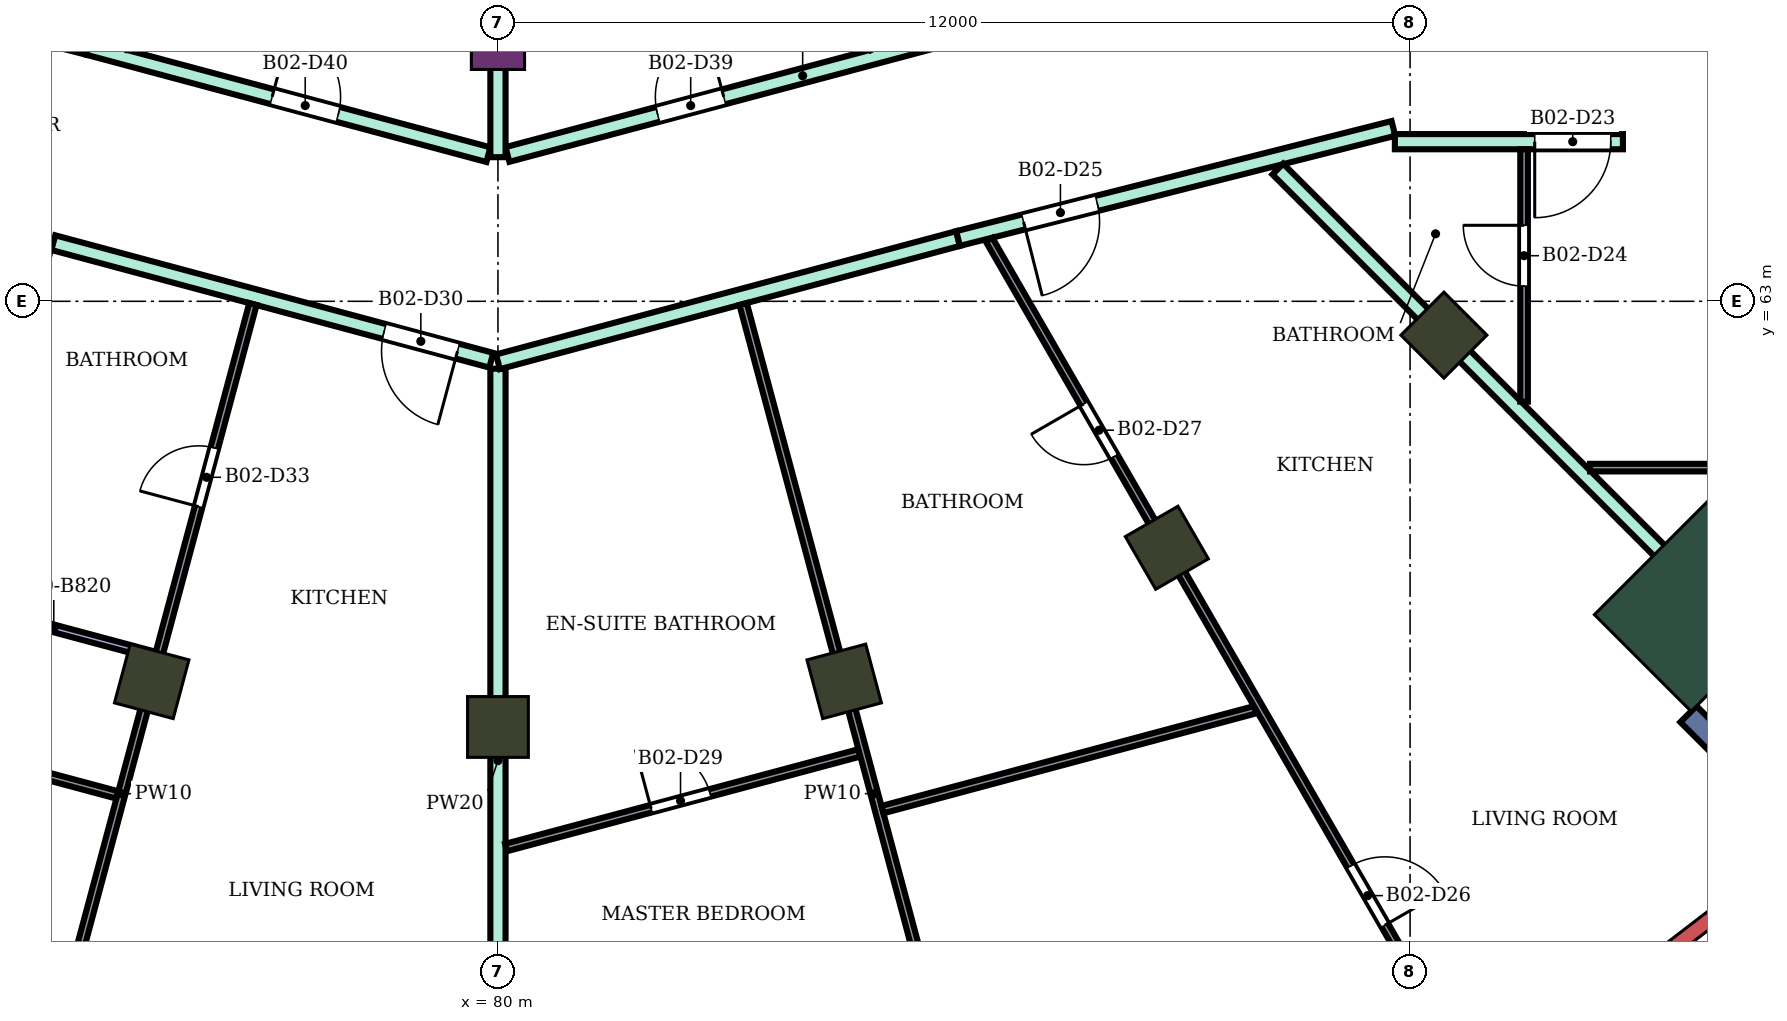
"""IFC4 building model, lengths in metres.
Left out: names, types, materials, properties, quantities, classifications, styles, units other than length and angle.
Written with IfcOpenShell. Run it as: python <this file> out.ifc"""

import sys

from ifc_helpers import new_model, si_unit, direction, frame, frame_2d, origin, origin_2d, place, context, subcontext, project, spatial, rectangle, extrude, element, fill, save


model = new_model("IFC4")
c1 = context("Model", 3, precision=1e-05, world=origin(), true_north=direction((0.0, 1.0)))
c2 = subcontext(c1, "Body", "Model", "MODEL_VIEW")
j1 = project(units=[si_unit("LENGTHUNIT", "METRE"), si_unit("PLANEANGLEUNIT", "RADIAN")], contexts=[c1])
p1 = place(None, origin())
s1 = spatial("IfcSite", under=j1, at=p1, CompositionType="ELEMENT")
p2 = place(p1, origin())
s2 = spatial("IfcBuilding", under=s1, at=p2, CompositionType="ELEMENT")
p3 = place(p2, frame((0.0, 0.0, 220.9)))
s3 = spatial("IfcBuildingStorey", under=s2, at=p3, CompositionType="ELEMENT", Elevation=220.9)
for number, where, z_axis, x_axis in (
    (1, (75.445, 58.0, 0.0), (0.0, 0.0, 1.0), (-0.259, -0.966, 0.0)),
    (2, (80.0, 57.4, 0.0), (0.0, 0.0, 1.0), (0.0, -1.0, 0.0)),
    (3, (84.555, 58.0, 0.0), (0.0, 0.0, 1.0), (0.259, -0.966, 0.0)),
    (4, (88.8, 59.758, 0.0), (0.0, 0.0, 1.0), (0.5, -0.866, 0.0)),
    (5, (92.445, 62.555, 0.0), (0.0, 0.0, 1.0), (0.707, -0.707, 0.0)),
):
    element("IfcColumn", number, at=place(p3, frame(where, z_axis=z_axis, x_axis=x_axis)), inside=s3, PredefinedType="COLUMN", context=c2, shape_type="SweptSolid", body=[
        extrude(rectangle(XDim=0.8, YDim=0.8, at=origin_2d()), origin(), (0.0, 0.0, 1.0), 4.2),
    ])
p4 = place(p3, frame((80.0, 66.4, 0.0), z_axis=(0.0, 0.0, 1.0), x_axis=(0.0, -1.0, 0.0)))
e6 = element("IfcColumn", 6, at=p4, inside=s3, PredefinedType="COLUMN", context=c2, shape_type="SweptSolid", body=[
    extrude(rectangle(XDim=0.7, YDim=0.7, at=origin_2d()), origin(), (0.0, 0.0, 1.0), 4.2),
])
p5 = place(p3, frame((95.91, 59.09, 0.0), z_axis=(0.0, 0.0, 1.0), x_axis=(0.707106781187, -0.707106781187, 0.0)))
e7 = element("IfcColumn", 7, at=p5, inside=s3, PredefinedType="COLUMN", context=c2, shape_type="SweptSolid", body=[
    extrude(rectangle(XDim=1.8, YDim=2.4, at=origin_2d()), origin(), (0.0, 0.0, 1.0), 4.2),
])
p6 = place(p3, frame((95.662, 57.57, 0.0), z_axis=(0.0, 0.0, 1.0), x_axis=(0.707106781187, -0.707106781187, 0.0)))
e8 = element("IfcWall", 8, at=p6, inside=s3, PredefinedType="NOTDEFINED", context=c2, shape_type="SweptSolid", body=[
    extrude(rectangle(XDim=2.416, YDim=0.3, at=frame_2d((1.208, 0.0))), origin(), (0.0, 0.0, 1.0), 4.2),
])
p7 = place(p3, frame((72.1, 66.975, 0.0), z_axis=(0.0, 0.0, 1.0), x_axis=(0.969471314457, -0.245204752086, 0.0)))
e9 = element("IfcWall", 9, at=p7, inside=s3, PredefinedType="PARTITIONING", context=c2, shape_type="SweptSolid", body=[
    extrude(rectangle(XDim=2.582, YDim=0.2, at=frame_2d((1.291, 0.0))), origin(), (0.0, 0.0, 1.0), 3.75),
])
p8 = place(p7, frame((0.841, 0.0, 0.0)))
e10 = element("IfcOpeningElement", 10, at=p8, cuts=e9, PredefinedType="OPENING", context=c2, shape_type="SweptSolid", body=[
    extrude(rectangle(XDim=0.9, YDim=2.1, at=frame_2d((0.45, 1.05))), frame((0.0, 0.11, 0.0), z_axis=(0.0, -1.0, 0.0), x_axis=(1.0, 0.0, 0.0)), (0.0, 0.0, 1.0), 0.22),
])
p9 = place(p3, frame((74.15, 63.772, 0.0), z_axis=(0.0, 0.0, 1.0), x_axis=(0.965807109237, -0.259261697417, 0.0)))
e11 = element("IfcWall", 11, at=p9, inside=s3, PredefinedType="PARTITIONING", context=c2, shape_type="SweptSolid", body=[
    extrude(rectangle(XDim=5.967, YDim=0.2, at=frame_2d((2.983, 0.0))), origin(), (0.0, 0.0, 1.0), 3.75),
])
p10 = place(p9, frame((4.507, 0.0, 0.0)))
e12 = element("IfcOpeningElement", 12, at=p10, cuts=e11, PredefinedType="OPENING", context=c2, shape_type="SweptSolid", body=[
    extrude(rectangle(XDim=1.0, YDim=2.1, at=frame_2d((0.5, 1.05))), frame((0.0, 0.11, 0.0), z_axis=(0.0, -1.0, 0.0), x_axis=(1.0, 0.0, 0.0)), (0.0, 0.0, 1.0), 0.22),
])
p11 = place(p3, frame((74.603, 66.342, 0.0), z_axis=(0.0, 0.0, 1.0), x_axis=(0.965920893652, -0.258837453254, 0.0)))
e13 = element("IfcWall", 13, at=p11, inside=s3, PredefinedType="PARTITIONING", context=c2, shape_type="SweptSolid", body=[
    extrude(rectangle(XDim=5.458, YDim=0.2, at=frame_2d((2.729, 0.0))), origin(), (0.0, 0.0, 1.0), 3.75),
])
p12 = place(p11, frame((2.512, 0.0, 0.0)))
e14 = element("IfcOpeningElement", 14, at=p12, cuts=e13, PredefinedType="OPENING", context=c2, shape_type="SweptSolid", body=[
    extrude(rectangle(XDim=0.9, YDim=2.1, at=frame_2d((0.45, 1.05))), frame((0.0, 0.11, 0.0), z_axis=(0.0, -1.0, 0.0), x_axis=(1.0, 0.0, 0.0)), (0.0, 0.0, 1.0), 0.22),
])
p13 = place(p3, frame((80.125, 64.932, 0.0), z_axis=(0.0, 0.0, 1.0), x_axis=(0.966236955806, 0.257655089674, 0.0)))
e15 = element("IfcWall", 15, at=p13, inside=s3, PredefinedType="PARTITIONING", context=c2, shape_type="SweptSolid", body=[
    extrude(rectangle(XDim=8.039, YDim=0.2, at=frame_2d((4.02, 0.0))), origin(), (0.0, 0.0, 1.0), 3.75),
])
p14 = place(p13, frame((6.298, 0.0, 0.0)))
e16 = element("IfcOpeningElement", 16, at=p14, cuts=e15, PredefinedType="OPENING", context=c2, shape_type="SweptSolid", body=[
    extrude(rectangle(XDim=0.9, YDim=2.1, at=frame_2d((0.45, 1.05))), frame((0.0, 0.11, 0.0), z_axis=(0.0, -1.0, 0.0), x_axis=(1.0, 0.0, 0.0)), (0.0, 0.0, 1.0), 0.22),
])
p15 = place(p13, frame((2.045, 0.0, 0.0)))
e17 = element("IfcOpeningElement", 17, at=p15, cuts=e15, PredefinedType="OPENING", context=c2, shape_type="SweptSolid", body=[
    extrude(rectangle(XDim=0.9, YDim=2.1, at=frame_2d((0.45, 1.05))), frame((0.0, 0.11, 0.0), z_axis=(0.0, -1.0, 0.0), x_axis=(1.0, 0.0, 0.0)), (0.0, 0.0, 1.0), 0.22),
])
p16 = place(p3, frame((80.0, 51.8, 0.0), z_axis=(0.0, 0.0, 1.0), x_axis=(0.0, 1.0, 0.0)))
e18 = element("IfcWall", 18, at=p16, inside=s3, PredefinedType="PARTITIONING", context=c2, shape_type="SweptSolid", body=[
    extrude(rectangle(XDim=10.314, YDim=0.2, at=frame_2d((5.157, 0.0))), origin(), (0.0, 0.0, 1.0), 3.75),
])
p17 = place(p3, frame((80.0, 62.204, 0.0), z_axis=(0.0, 0.0, 1.0), x_axis=(0.965938139786, 0.258773086132, 0.0)))
e19 = element("IfcWall", 19, at=p17, inside=s3, PredefinedType="PARTITIONING", context=c2, shape_type="SweptSolid", body=[
    extrude(rectangle(XDim=6.266, YDim=0.2, at=frame_2d((3.133, 0.0))), origin(), (0.0, 0.0, 1.0), 3.75),
])
p18 = place(p3, frame((80.0, 64.896, 0.0), z_axis=(0.0, 0.0, 1.0), x_axis=(0.0, 1.0, 0.0)))
e20 = element("IfcWall", 20, at=p18, inside=s3, PredefinedType="PARTITIONING", context=c2, shape_type="SweptSolid", body=[
    extrude(rectangle(XDim=2.405, YDim=0.2, at=frame_2d((1.203, 0.0))), origin(), (0.0, 0.0, 1.0), 3.75),
])
p19 = place(p3, frame((86.053, 63.826, 0.0), z_axis=(0.0, 0.0, 1.0), x_axis=(0.969490004987, 0.245130843083, 0.0)))
e21 = element("IfcWall", 21, at=p19, inside=s3, PredefinedType="PARTITIONING", context=c2, shape_type="SweptSolid", body=[
    extrude(rectangle(XDim=5.908, YDim=0.2, at=frame_2d((2.954, 0.0))), origin(), (0.0, 0.0, 1.0), 3.75),
])
p20 = place(p19, frame((0.889, 0.0, 0.0)))
e22 = element("IfcOpeningElement", 22, at=p20, cuts=e21, PredefinedType="OPENING", context=c2, shape_type="SweptSolid", body=[
    extrude(rectangle(XDim=1.0, YDim=2.1, at=frame_2d((0.5, 1.05))), frame((0.0, 0.11, 0.0), z_axis=(0.0, -1.0, 0.0), x_axis=(1.0, 0.0, 0.0)), (0.0, 0.0, 1.0), 0.22),
])
p21 = place(p3, frame((90.26, 64.74, 0.0), z_axis=(0.0, 0.0, 1.0), x_axis=(0.707106781187, -0.707106781187, 0.0)))
e23 = element("IfcWall", 23, at=p21, inside=s3, PredefinedType="PARTITIONING", context=c2, shape_type="SweptSolid", body=[
    extrude(rectangle(XDim=8.69, YDim=0.2, at=frame_2d((4.345, 0.0))), origin(), (0.0, 0.0, 1.0), 3.75),
])
p22 = place(p3, frame((91.8, 65.1, 0.0), z_axis=(0.0, 0.0, 1.0), x_axis=(1.0, 0.0, 0.0)))
e24 = element("IfcWall", 24, at=p22, inside=s3, PredefinedType="PARTITIONING", context=c2, shape_type="SweptSolid", body=[
    extrude(rectangle(XDim=3.0, YDim=0.2, at=frame_2d((1.5, 0.0))), origin(), (0.0, 0.0, 1.0), 3.75),
])
p23 = place(p22, frame((1.84, 0.0, 0.0)))
e25 = element("IfcOpeningElement", 25, at=p23, cuts=e24, PredefinedType="OPENING", context=c2, shape_type="SweptSolid", body=[
    extrude(rectangle(XDim=1.0, YDim=2.1, at=frame_2d((0.5, 1.05))), frame((0.0, 0.11, 0.0), z_axis=(0.0, -1.0, 0.0), x_axis=(1.0, 0.0, 0.0)), (0.0, 0.0, 1.0), 0.22),
])
p24 = place(p3, frame((70.188, 57.793, 0.0), z_axis=(0.0, 0.0, 1.0), x_axis=(0.965913212633, -0.258866115322, 0.0)))
e26 = element("IfcWall", 26, at=p24, inside=s3, PredefinedType="PARTITIONING", context=c2, shape_type="SweptSolid", body=[
    extrude(rectangle(XDim=4.974, YDim=0.1, at=frame_2d((2.487, 0.0))), origin(), (0.0, 0.0, 1.0), 3.75),
])
p25 = place(p24, frame((2.057, 0.0, 0.0)))
e27 = element("IfcOpeningElement", 27, at=p25, cuts=e26, PredefinedType="OPENING", context=c2, shape_type="SweptSolid", body=[
    extrude(rectangle(XDim=0.8, YDim=2.1, at=frame_2d((0.4, 1.05))), frame((0.0, 0.06, 0.0), z_axis=(0.0, -1.0, 0.0), x_axis=(1.0, 0.0, 0.0)), (0.0, 0.0, 1.0), 0.12),
])
p26 = place(p3, frame((72.828, 59.053, 0.0), z_axis=(0.0, 0.0, 1.0), x_axis=(0.965899705866, -0.25891650818, 0.0)))
e28 = element("IfcWall", 28, at=p26, inside=s3, PredefinedType="PARTITIONING", context=c2, shape_type="SweptSolid", body=[
    extrude(rectangle(XDim=2.75, YDim=0.1, at=frame_2d((1.375, 0.0))), origin(), (0.0, 0.0, 1.0), 3.38),
])
p27 = place(p3, frame((73.323, 50.081, 0.0), z_axis=(0.0, 0.0, 1.0), x_axis=(0.258961147073, 0.965887738977, 0.0)))
e29 = element("IfcWall", 29, at=p27, inside=s3, PredefinedType="PARTITIONING", context=c2, shape_type="SweptSolid", body=[
    extrude(rectangle(XDim=13.338, YDim=0.1, at=frame_2d((6.669, 0.0))), origin(), (0.0, 0.0, 1.0), 3.75),
])
p28 = place(p27, frame((2.904, 0.0, 0.0)))
e30 = element("IfcOpeningElement", 30, at=p28, cuts=e29, PredefinedType="OPENING", context=c2, shape_type="SweptSolid", body=[
    extrude(rectangle(XDim=0.9, YDim=2.1, at=frame_2d((0.45, 1.05))), frame((0.0, 0.06, 0.0), z_axis=(0.0, -1.0, 0.0), x_axis=(1.0, 0.0, 0.0)), (0.0, 0.0, 1.0), 0.12),
])
p29 = place(p27, frame((10.578, 0.0, 0.0)))
e31 = element("IfcOpeningElement", 31, at=p29, cuts=e29, PredefinedType="OPENING", context=c2, shape_type="SweptSolid", body=[
    extrude(rectangle(XDim=0.8, YDim=2.1, at=frame_2d((0.4, 1.05))), frame((0.0, 0.06, 0.0), z_axis=(0.0, -1.0, 0.0), x_axis=(1.0, 0.0, 0.0)), (0.0, 0.0, 1.0), 0.12),
])
p30 = place(p3, frame((80.106, 55.813, 0.0), z_axis=(0.0, 0.0, 1.0), x_axis=(0.965936279421, 0.25878003033, 0.0)))
e32 = element("IfcWall", 32, at=p30, inside=s3, PredefinedType="PARTITIONING", context=c2, shape_type="SweptSolid", body=[
    extrude(rectangle(XDim=4.813, YDim=0.1, at=frame_2d((2.407, 0.0))), origin(), (0.0, 0.0, 1.0), 3.75),
])
p31 = place(p30, frame((1.977, 0.0, 0.0)))
e33 = element("IfcOpeningElement", 33, at=p31, cuts=e32, PredefinedType="OPENING", context=c2, shape_type="SweptSolid", body=[
    extrude(rectangle(XDim=0.8, YDim=2.1, at=frame_2d((0.4, 1.05))), frame((0.0, 0.06, 0.0), z_axis=(0.0, -1.0, 0.0), x_axis=(1.0, 0.0, 0.0)), (0.0, 0.0, 1.0), 0.12),
])
p32 = place(p3, frame((83.225, 62.965, 0.0), z_axis=(0.0, 0.0, 1.0), x_axis=(0.258742489642, -0.965946336012, 0.0)))
e34 = element("IfcWall", 34, at=p32, inside=s3, PredefinedType="PARTITIONING", context=c2, shape_type="SweptSolid", body=[
    extrude(rectangle(XDim=13.338, YDim=0.1, at=frame_2d((6.669, 0.0))), origin(), (0.0, 0.0, 1.0), 3.75),
])
p33 = place(p32, frame((9.644, 0.0, 0.0)))
e35 = element("IfcOpeningElement", 35, at=p33, cuts=e34, PredefinedType="OPENING", context=c2, shape_type="SweptSolid", body=[
    extrude(rectangle(XDim=0.9, YDim=2.1, at=frame_2d((0.45, 1.05))), frame((0.0, 0.06, 0.0), z_axis=(0.0, -1.0, 0.0), x_axis=(1.0, 0.0, 0.0)), (0.0, 0.0, 1.0), 0.12),
])
p34 = place(p3, frame((85.059, 56.313, 0.0), z_axis=(0.0, 0.0, 1.0), x_axis=(0.965911776939, 0.2588714723, 0.0)))
e36 = element("IfcWall", 36, at=p34, inside=s3, PredefinedType="PARTITIONING", context=c2, shape_type="SweptSolid", body=[
    extrude(rectangle(XDim=5.078, YDim=0.1, at=frame_2d((2.539, 0.0))), origin(), (0.0, 0.0, 1.0), 3.75),
])
p35 = place(p3, frame((86.461, 63.81, 0.0), z_axis=(0.0, 0.0, 1.0), x_axis=(0.499925973464, -0.866068138806, 0.0)))
e37 = element("IfcWall", 37, at=p35, inside=s3, PredefinedType="PARTITIONING", context=c2, shape_type="SweptSolid", body=[
    extrude(rectangle(XDim=12.876, YDim=0.1, at=frame_2d((6.438, 0.0))), origin(), (0.0, 0.0, 1.0), 3.75),
])
p36 = place(p35, frame((9.514, 0.0, 0.0)))
e38 = element("IfcOpeningElement", 38, at=p36, cuts=e37, PredefinedType="OPENING", context=c2, shape_type="SweptSolid", body=[
    extrude(rectangle(XDim=0.9, YDim=2.1, at=frame_2d((0.45, 1.05))), frame((0.0, 0.06, 0.0), z_axis=(0.0, -1.0, 0.0), x_axis=(1.0, 0.0, 0.0)), (0.0, 0.0, 1.0), 0.12),
])
p37 = place(p35, frame((2.494, 0.0, 0.0)))
e39 = element("IfcOpeningElement", 39, at=p37, cuts=e37, PredefinedType="OPENING", context=c2, shape_type="SweptSolid", body=[
    extrude(rectangle(XDim=0.8, YDim=2.1, at=frame_2d((0.4, 1.05))), frame((0.0, 0.06, 0.0), z_axis=(0.0, -1.0, 0.0), x_axis=(1.0, 0.0, 0.0)), (0.0, 0.0, 1.0), 0.12),
])
p38 = place(p3, frame((93.5, 61.68, 0.0), z_axis=(0.0, 0.0, 1.0), x_axis=(0.0, 1.0, 0.0)))
e40 = element("IfcWall", 40, at=p38, inside=s3, PredefinedType="PARTITIONING", context=c2, shape_type="SweptSolid", body=[
    extrude(rectangle(XDim=3.32, YDim=0.1, at=frame_2d((1.66, 0.0))), origin(), (0.0, 0.0, 1.0), 3.75),
])
p39 = place(p38, frame((1.52, 0.0, 0.0)))
e41 = element("IfcOpeningElement", 41, at=p39, cuts=e40, PredefinedType="OPENING", context=c2, shape_type="SweptSolid", body=[
    extrude(rectangle(XDim=0.8, YDim=2.1, at=frame_2d((0.4, 1.05))), frame((0.0, 0.06, 0.0), z_axis=(0.0, -1.0, 0.0), x_axis=(1.0, 0.0, 0.0)), (0.0, 0.0, 1.0), 0.12),
])
p40 = place(p3, frame((94.368, 60.812, 0.0), z_axis=(0.0, 0.0, 1.0), x_axis=(1.0, 0.0, 0.0)))
e42 = element("IfcWall", 42, at=p40, inside=s3, PredefinedType="PARTITIONING", context=c2, shape_type="SweptSolid", body=[
    extrude(rectangle(XDim=7.032, YDim=0.1, at=frame_2d((3.516, 0.0))), origin(), (0.0, 0.0, 1.0), 3.75),
])
p41 = place(p40, frame((2.927, 0.0, 0.0)))
e43 = element("IfcOpeningElement", 43, at=p41, cuts=e42, PredefinedType="OPENING", context=c2, shape_type="SweptSolid", body=[
    extrude(rectangle(XDim=0.9, YDim=2.1, at=frame_2d((0.45, 1.05))), frame((0.0, 0.06, 0.0), z_axis=(0.0, -1.0, 0.0), x_axis=(1.0, 0.0, 0.0)), (0.0, 0.0, 1.0), 0.12),
])
p42 = place(p23, frame((1.0, 0.0, 0.0), z_axis=(0.0, 0.0, 1.0), x_axis=(-1.0, 0.0, 0.0)))
e44 = element("IfcDoor", 44, at=p42, inside=s3, OperationType="SINGLE_SWING_RIGHT", PredefinedType="DOOR", context=c2, shape_type="SweptSolid", body=[
    extrude(rectangle(XDim=1.0, YDim=2.1, at=frame_2d((0.5, 1.05))), frame((0.0, 0.025, 0.0), z_axis=(0.0, -1.0, 0.0), x_axis=(1.0, 0.0, 0.0)), (0.0, 0.0, 1.0), 0.05),
])
fill(e25, e44)
p43 = place(p39, origin())
e45 = element("IfcDoor", 45, at=p43, inside=s3, OperationType="SINGLE_SWING_RIGHT", PredefinedType="DOOR", context=c2, shape_type="SweptSolid", body=[
    extrude(rectangle(XDim=0.8, YDim=2.1, at=frame_2d((0.4, 1.05))), frame((0.0, 0.025, 0.0), z_axis=(0.0, -1.0, 0.0), x_axis=(1.0, 0.0, 0.0)), (0.0, 0.0, 1.0), 0.05),
])
fill(e41, e45)
p44 = place(p20, frame((1.0, 0.0, 0.0), z_axis=(0.0, 0.0, 1.0), x_axis=(-1.0, 0.0, 0.0)))
e46 = element("IfcDoor", 46, at=p44, inside=s3, OperationType="SINGLE_SWING_RIGHT", PredefinedType="DOOR", context=c2, shape_type="SweptSolid", body=[
    extrude(rectangle(XDim=1.0, YDim=2.1, at=frame_2d((0.5, 1.05))), frame((0.0, 0.025, 0.0), z_axis=(0.0, -1.0, 0.0), x_axis=(1.0, 0.0, 0.0)), (0.0, 0.0, 1.0), 0.05),
])
fill(e22, e46)
p45 = place(p36, origin())
e47 = element("IfcDoor", 47, at=p45, inside=s3, OperationType="SINGLE_SWING_RIGHT", PredefinedType="DOOR", context=c2, shape_type="SweptSolid", body=[
    extrude(rectangle(XDim=0.9, YDim=2.1, at=frame_2d((0.45, 1.05))), frame((0.0, 0.025, 0.0), z_axis=(0.0, -1.0, 0.0), x_axis=(1.0, 0.0, 0.0)), (0.0, 0.0, 1.0), 0.05),
])
fill(e38, e47)
p46 = place(p37, frame((0.8, 0.0, 0.0), z_axis=(0.0, 0.0, 1.0), x_axis=(-1.0, 0.0, 0.0)))
e48 = element("IfcDoor", 48, at=p46, inside=s3, OperationType="SINGLE_SWING_RIGHT", PredefinedType="DOOR", context=c2, shape_type="SweptSolid", body=[
    extrude(rectangle(XDim=0.8, YDim=2.1, at=frame_2d((0.4, 1.05))), frame((0.0, 0.025, 0.0), z_axis=(0.0, -1.0, 0.0), x_axis=(1.0, 0.0, 0.0)), (0.0, 0.0, 1.0), 0.05),
])
fill(e39, e48)
p47 = place(p31, origin())
e49 = element("IfcDoor", 49, at=p47, inside=s3, OperationType="SINGLE_SWING_LEFT", PredefinedType="DOOR", context=c2, shape_type="SweptSolid", body=[
    extrude(rectangle(XDim=0.8, YDim=2.1, at=frame_2d((0.4, 1.05))), frame((0.0, 0.025, 0.0), z_axis=(0.0, -1.0, 0.0), x_axis=(1.0, 0.0, 0.0)), (0.0, 0.0, 1.0), 0.05),
])
fill(e33, e49)
p48 = place(p10, frame((1.0, 0.0, 0.0), z_axis=(0.0, 0.0, 1.0), x_axis=(-1.0, 0.0, 0.0)))
e50 = element("IfcDoor", 50, at=p48, inside=s3, OperationType="SINGLE_SWING_LEFT", PredefinedType="DOOR", context=c2, shape_type="SweptSolid", body=[
    extrude(rectangle(XDim=1.0, YDim=2.1, at=frame_2d((0.5, 1.05))), frame((0.0, 0.025, 0.0), z_axis=(0.0, -1.0, 0.0), x_axis=(1.0, 0.0, 0.0)), (0.0, 0.0, 1.0), 0.05),
])
fill(e12, e50)
p49 = place(p29, origin())
e51 = element("IfcDoor", 51, at=p49, inside=s3, OperationType="SINGLE_SWING_LEFT", PredefinedType="DOOR", context=c2, shape_type="SweptSolid", body=[
    extrude(rectangle(XDim=0.8, YDim=2.1, at=frame_2d((0.4, 1.05))), frame((0.0, 0.025, 0.0), z_axis=(0.0, -1.0, 0.0), x_axis=(1.0, 0.0, 0.0)), (0.0, 0.0, 1.0), 0.05),
])
fill(e31, e51)
p50 = place(p15, origin())
e52 = element("IfcDoor", 52, at=p50, inside=s3, OperationType="SINGLE_SWING_RIGHT", PredefinedType="DOOR", context=c2, shape_type="SweptSolid", body=[
    extrude(rectangle(XDim=0.9, YDim=2.1, at=frame_2d((0.45, 1.05))), frame((0.0, 0.025, 0.0), z_axis=(0.0, -1.0, 0.0), x_axis=(1.0, 0.0, 0.0)), (0.0, 0.0, 1.0), 0.05),
])
fill(e17, e52)
p51 = place(p12, origin())
e53 = element("IfcDoor", 53, at=p51, inside=s3, OperationType="SINGLE_SWING_LEFT", PredefinedType="DOOR", context=c2, shape_type="SweptSolid", body=[
    extrude(rectangle(XDim=0.9, YDim=2.1, at=frame_2d((0.45, 1.05))), frame((0.0, 0.025, 0.0), z_axis=(0.0, -1.0, 0.0), x_axis=(1.0, 0.0, 0.0)), (0.0, 0.0, 1.0), 0.05),
])
fill(e14, e53)
save(model, sys.argv[1])
